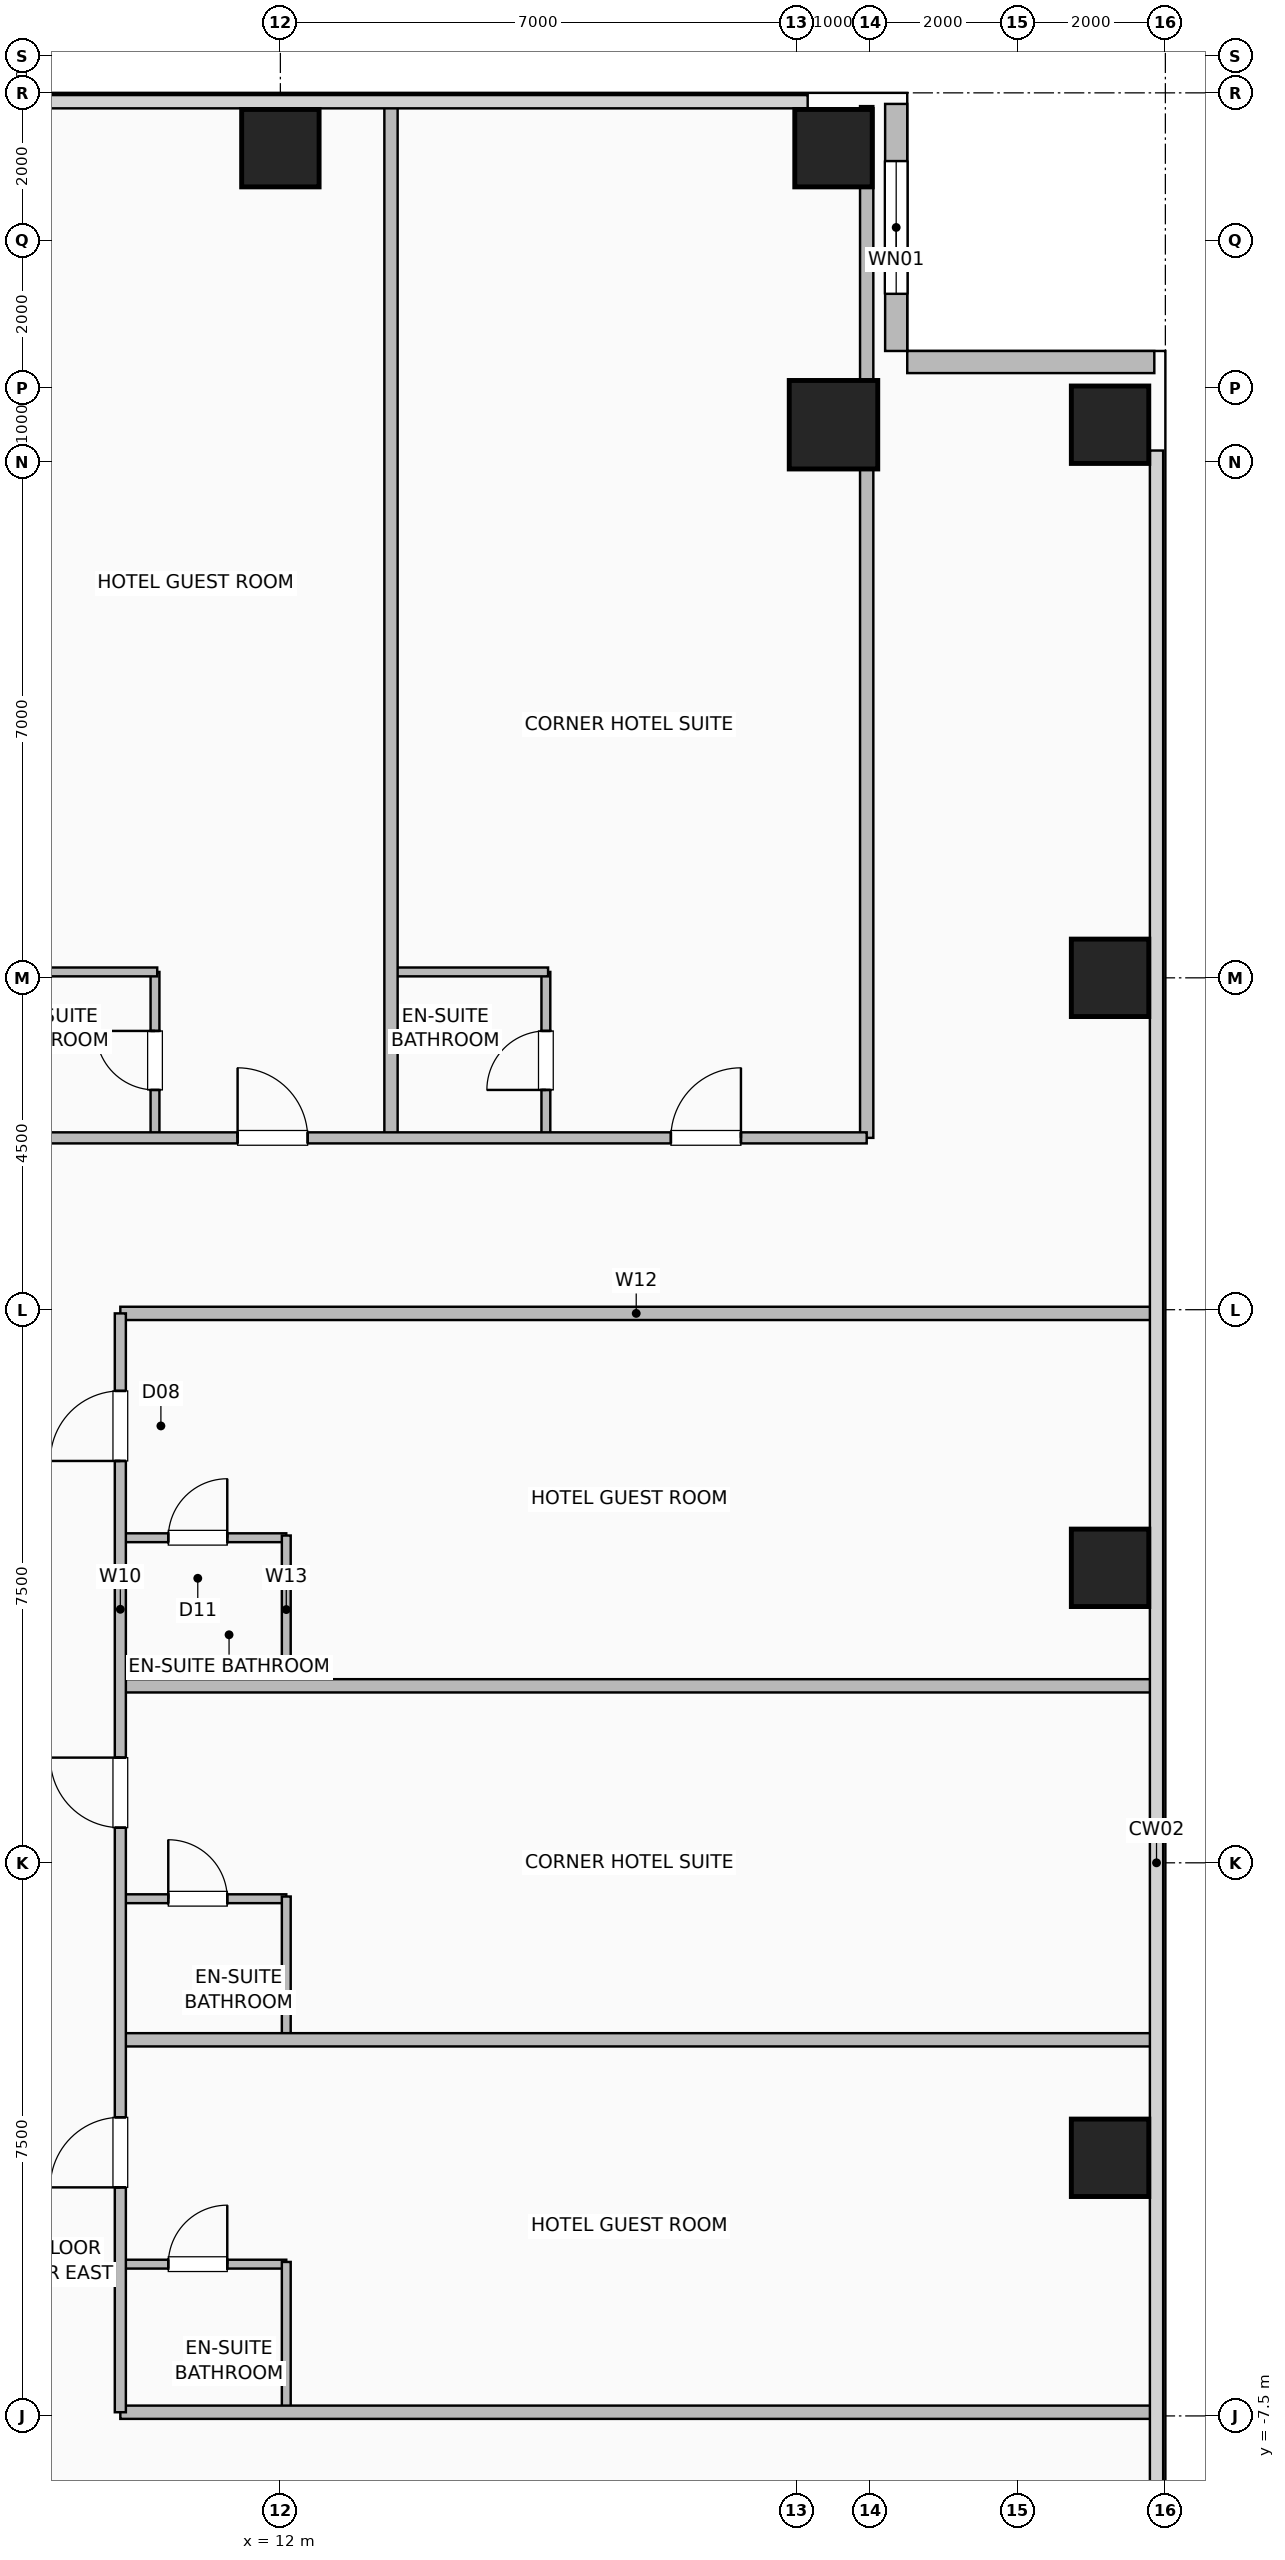
"""IFC4 building model, lengths in metres.
Left out: names, types, materials, properties, quantities, classifications, styles, units other than length and angle.
Written with IfcOpenShell. Run it as: python <this file> out.ifc"""

import sys

from ifc_helpers import new_model, si_unit, direction, frame, frame_2d, origin, origin_2d, place, context, subcontext, project, spatial, rectangle, hollow_rectangle, extrude, element, fill, save


model = new_model("IFC4")
c1 = context("Model", 3, precision=1e-05, world=origin(), true_north=direction((0.0, 1.0)))
c2 = subcontext(c1, "Body", "Model", "MODEL_VIEW")
j1 = project(units=[si_unit("LENGTHUNIT", "METRE"), si_unit("PLANEANGLEUNIT", "RADIAN")], contexts=[c1])
p1 = place(None, origin())
s1 = spatial("IfcSite", under=j1, at=p1, CompositionType="ELEMENT")
p2 = place(p1, origin())
s2 = spatial("IfcBuilding", under=s1, at=p2, CompositionType="ELEMENT")
p3 = place(p2, frame((0.0, 0.0, 72.5)))
s3 = spatial("IfcBuildingStorey", under=s2, at=p3, CompositionType="ELEMENT", Elevation=72.5)
for number, where, z_axis, x_axis in (
    (1, (23.25, -4.0, 0.0), (0.0, 0.0, 1.0), (1.0, 0.0, 0.0)),
    (2, (23.25, 4.0, 0.0), (0.0, 0.0, 1.0), (1.0, 0.0, 0.0)),
    (3, (12.0, 23.25, 0.0), (0.0, 0.0, 1.0), (1.0, 0.0, 0.0)),
    (4, (23.25, 12.0, 0.0), (0.0, 0.0, 1.0), (1.0, 0.0, 0.0)),
    (5, (19.5, 23.25, 0.0), (0.0, 0.0, 1.0), (1.0, 0.0, 0.0)),
    (6, (23.25, 19.5, 0.0), (0.0, 0.0, 1.0), (1.0, 0.0, 0.0)),
):
    element("IfcColumn", number, at=place(p3, frame(where, z_axis=z_axis, x_axis=x_axis)), inside=s3, PredefinedType="COLUMN", context=c2, shape_type="SweptSolid", body=[
        extrude(hollow_rectangle(XDim=1.05, YDim=1.05, WallThickness=0.05, at=origin_2d()), origin(), (0.0, 0.0, 1.0), 3.5),
    ])
p4 = place(p3, frame((19.5, 19.5, 0.0), z_axis=(0.0, 0.0, 1.0), x_axis=(1.0, 0.0, 0.0)))
e7 = element("IfcColumn", 7, at=p4, inside=s3, PredefinedType="COLUMN", context=c2, shape_type="SweptSolid", body=[
    extrude(hollow_rectangle(XDim=1.2, YDim=1.2, WallThickness=0.055, at=origin_2d()), origin(), (0.0, 0.0, 1.0), 3.5),
])
p5 = place(p3, frame((20.35, 23.85, 0.0), z_axis=(0.0, 0.0, 1.0), x_axis=(0.0, -1.0, 0.0)))
e8 = element("IfcWall", 8, at=p5, inside=s3, PredefinedType="SOLIDWALL", context=c2, shape_type="SweptSolid", body=[
    extrude(rectangle(XDim=3.35, YDim=0.3, at=frame_2d((1.675, 0.0))), origin(), (0.0, 0.0, 1.0), 3.25),
])
p6 = place(p5, frame((0.775, 0.0, 0.9)))
e9 = element("IfcOpeningElement", 9, at=p6, cuts=e8, PredefinedType="OPENING", context=c2, shape_type="SweptSolid", body=[
    extrude(rectangle(XDim=1.8, YDim=1.8, at=frame_2d((0.9, 0.9))), frame((0.0, 0.16, 0.0), z_axis=(0.0, -1.0, 0.0), x_axis=(1.0, 0.0, 0.0)), (0.0, 0.0, 1.0), 0.32),
])
p7 = place(p3, frame((23.85, 20.35, 0.0), z_axis=(0.0, 0.0, 1.0), x_axis=(-1.0, 0.0, 0.0)))
e10 = element("IfcWall", 10, at=p7, inside=s3, PredefinedType="SOLIDWALL", context=c2, shape_type="SweptSolid", body=[
    extrude(rectangle(XDim=3.35, YDim=0.3, at=frame_2d((1.675, 0.0))), origin(), (0.0, 0.0, 1.0), 3.25),
])
p8 = place(p3, frame((10.3, 9.83, 0.0), z_axis=(0.0, 0.0, 1.0), x_axis=(0.0, 1.0, 0.0)))
e11 = element("IfcWall", 11, at=p8, inside=s3, PredefinedType="PLUMBINGWALL", context=c2, shape_type="SweptSolid", body=[
    extrude(rectangle(XDim=2.25, YDim=0.12, at=frame_2d((1.125, 0.0))), origin(), (0.0, 0.0, 1.0), 3.25),
])
p9 = place(p8, frame((0.65, 0.0, 0.0)))
e12 = element("IfcOpeningElement", 12, at=p9, cuts=e11, PredefinedType="OPENING", context=c2, shape_type="SweptSolid", body=[
    extrude(rectangle(XDim=0.8, YDim=2.05, at=frame_2d((0.4, 1.025))), frame((0.0, 0.07, 0.0), z_axis=(0.0, -1.0, 0.0), x_axis=(1.0, 0.0, 0.0)), (0.0, 0.0, 1.0), 0.14),
])
p10 = place(p3, frame((8.23, 12.08, 0.0), z_axis=(0.0, 0.0, 1.0), x_axis=(1.0, 0.0, 0.0)))
e13 = element("IfcWall", 13, at=p10, inside=s3, PredefinedType="PLUMBINGWALL", context=c2, shape_type="SweptSolid", body=[
    extrude(rectangle(XDim=2.1, YDim=0.12, at=frame_2d((1.05, 0.0))), origin(), (0.0, 0.0, 1.0), 3.25),
])
p11 = place(p3, frame((15.6, 9.83, 0.0), z_axis=(0.0, 0.0, 1.0), x_axis=(0.0, 1.0, 0.0)))
e14 = element("IfcWall", 14, at=p11, inside=s3, PredefinedType="PLUMBINGWALL", context=c2, shape_type="SweptSolid", body=[
    extrude(rectangle(XDim=2.25, YDim=0.12, at=frame_2d((1.125, 0.0))), origin(), (0.0, 0.0, 1.0), 3.25),
])
p12 = place(p11, frame((0.65, 0.0, 0.0)))
e15 = element("IfcOpeningElement", 15, at=p12, cuts=e14, PredefinedType="OPENING", context=c2, shape_type="SweptSolid", body=[
    extrude(rectangle(XDim=0.8, YDim=2.05, at=frame_2d((0.4, 1.025))), frame((0.0, 0.07, 0.0), z_axis=(0.0, -1.0, 0.0), x_axis=(1.0, 0.0, 0.0)), (0.0, 0.0, 1.0), 0.14),
])
p13 = place(p3, frame((13.53, 12.08, 0.0), z_axis=(0.0, 0.0, 1.0), x_axis=(1.0, 0.0, 0.0)))
e16 = element("IfcWall", 16, at=p13, inside=s3, PredefinedType="PLUMBINGWALL", context=c2, shape_type="SweptSolid", body=[
    extrude(rectangle(XDim=2.1, YDim=0.12, at=frame_2d((1.05, 0.0))), origin(), (0.0, 0.0, 1.0), 3.25),
])
for number, where, z_axis, x_axis in (
    (17, (13.5, 9.83, 0.0), (0.0, 0.0, 1.0), (0.0, 1.0, 0.0)),
    (18, (19.95, 9.83, 0.0), (0.0, 0.0, 1.0), (0.0, 1.0, 0.0)),
):
    element("IfcWall", number, at=place(p3, frame(where, z_axis=z_axis, x_axis=x_axis)), inside=s3, PredefinedType="PARTITIONING", context=c2, shape_type="SweptSolid", body=[
        extrude(rectangle(XDim=13.99, YDim=0.18, at=frame_2d((6.995, 0.0))), origin(), (0.0, 0.0, 1.0), 3.25),
    ])
p14 = place(p3, frame((-19.95, 9.83, 0.0), z_axis=(0.0, 0.0, 1.0), x_axis=(1.0, 0.0, 0.0)))
e19 = element("IfcWall", 19, at=p14, inside=s3, PredefinedType="PARTITIONING", context=c2, shape_type="SweptSolid", body=[
    extrude(rectangle(XDim=39.9, YDim=0.15, at=frame_2d((19.95, 0.0))), origin(), (0.0, 0.0, 1.0), 3.25),
])
p15 = place(p14, frame((3.945, 0.0, 0.0)))
e20 = element("IfcOpeningElement", 20, at=p15, cuts=e19, PredefinedType="OPENING", context=c2, shape_type="SweptSolid", body=[
    extrude(rectangle(XDim=0.95, YDim=2.08, at=frame_2d((0.475, 1.04))), frame((0.0, 0.085, 0.0), z_axis=(0.0, -1.0, 0.0), x_axis=(1.0, 0.0, 0.0)), (0.0, 0.0, 1.0), 0.17),
])
p16 = place(p14, frame((10.02, 0.0, 0.0)))
e21 = element("IfcOpeningElement", 21, at=p16, cuts=e19, PredefinedType="OPENING", context=c2, shape_type="SweptSolid", body=[
    extrude(rectangle(XDim=0.95, YDim=2.08, at=frame_2d((0.475, 1.04))), frame((0.0, 0.085, 0.0), z_axis=(0.0, -1.0, 0.0), x_axis=(1.0, 0.0, 0.0)), (0.0, 0.0, 1.0), 0.17),
])
p17 = place(p14, frame((15.42, 0.0, 0.0)))
e22 = element("IfcOpeningElement", 22, at=p17, cuts=e19, PredefinedType="OPENING", context=c2, shape_type="SweptSolid", body=[
    extrude(rectangle(XDim=0.95, YDim=2.08, at=frame_2d((0.475, 1.04))), frame((0.0, 0.085, 0.0), z_axis=(0.0, -1.0, 0.0), x_axis=(1.0, 0.0, 0.0)), (0.0, 0.0, 1.0), 0.17),
])
p18 = place(p14, frame((20.702, 0.0, 0.0)))
e23 = element("IfcOpeningElement", 23, at=p18, cuts=e19, PredefinedType="OPENING", context=c2, shape_type="SweptSolid", body=[
    extrude(rectangle(XDim=0.95, YDim=2.08, at=frame_2d((0.475, 1.04))), frame((0.0, 0.085, 0.0), z_axis=(0.0, -1.0, 0.0), x_axis=(1.0, 0.0, 0.0)), (0.0, 0.0, 1.0), 0.17),
])
p19 = place(p14, frame((26.02, 0.0, 0.0)))
e24 = element("IfcOpeningElement", 24, at=p19, cuts=e19, PredefinedType="OPENING", context=c2, shape_type="SweptSolid", body=[
    extrude(rectangle(XDim=0.95, YDim=2.08, at=frame_2d((0.475, 1.04))), frame((0.0, 0.085, 0.0), z_axis=(0.0, -1.0, 0.0), x_axis=(1.0, 0.0, 0.0)), (0.0, 0.0, 1.0), 0.17),
])
p20 = place(p14, frame((31.37, 0.0, 0.0)))
e25 = element("IfcOpeningElement", 25, at=p20, cuts=e19, PredefinedType="OPENING", context=c2, shape_type="SweptSolid", body=[
    extrude(rectangle(XDim=0.95, YDim=2.08, at=frame_2d((0.475, 1.04))), frame((0.0, 0.085, 0.0), z_axis=(0.0, -1.0, 0.0), x_axis=(1.0, 0.0, 0.0)), (0.0, 0.0, 1.0), 0.17),
])
p21 = place(p14, frame((37.245, 0.0, 0.0)))
e26 = element("IfcOpeningElement", 26, at=p21, cuts=e19, PredefinedType="OPENING", context=c2, shape_type="SweptSolid", body=[
    extrude(rectangle(XDim=0.95, YDim=2.08, at=frame_2d((0.475, 1.04))), frame((0.0, 0.085, 0.0), z_axis=(0.0, -1.0, 0.0), x_axis=(1.0, 0.0, 0.0)), (0.0, 0.0, 1.0), 0.17),
])
p22 = place(p3, frame((9.83, -5.442, 0.0), z_axis=(0.0, 0.0, 1.0), x_axis=(1.0, 0.0, 0.0)))
e27 = element("IfcWall", 27, at=p22, inside=s3, PredefinedType="PLUMBINGWALL", context=c2, shape_type="SweptSolid", body=[
    extrude(rectangle(XDim=2.25, YDim=0.12, at=frame_2d((1.125, 0.0))), origin(), (0.0, 0.0, 1.0), 3.25),
])
p23 = place(p22, frame((0.65, 0.0, 0.0)))
e28 = element("IfcOpeningElement", 28, at=p23, cuts=e27, PredefinedType="OPENING", context=c2, shape_type="SweptSolid", body=[
    extrude(rectangle(XDim=0.8, YDim=2.05, at=frame_2d((0.4, 1.025))), frame((0.0, 0.07, 0.0), z_axis=(0.0, -1.0, 0.0), x_axis=(1.0, 0.0, 0.0)), (0.0, 0.0, 1.0), 0.14),
])
p24 = place(p3, frame((12.08, -7.42, 0.0), z_axis=(0.0, 0.0, 1.0), x_axis=(0.0, 1.0, 0.0)))
e29 = element("IfcWall", 29, at=p24, inside=s3, PredefinedType="PLUMBINGWALL", context=c2, shape_type="SweptSolid", body=[
    extrude(rectangle(XDim=2.008, YDim=0.12, at=frame_2d((1.004, 0.0))), origin(), (0.0, 0.0, 1.0), 3.25),
])
p25 = place(p3, frame((9.83, -0.487, 0.0), z_axis=(0.0, 0.0, 1.0), x_axis=(1.0, 0.0, 0.0)))
e30 = element("IfcWall", 30, at=p25, inside=s3, PredefinedType="PLUMBINGWALL", context=c2, shape_type="SweptSolid", body=[
    extrude(rectangle(XDim=2.25, YDim=0.12, at=frame_2d((1.125, 0.0))), origin(), (0.0, 0.0, 1.0), 3.25),
])
p26 = place(p25, frame((0.65, 0.0, 0.0)))
e31 = element("IfcOpeningElement", 31, at=p26, cuts=e30, PredefinedType="OPENING", context=c2, shape_type="SweptSolid", body=[
    extrude(rectangle(XDim=0.8, YDim=2.05, at=frame_2d((0.4, 1.025))), frame((0.0, 0.07, 0.0), z_axis=(0.0, -1.0, 0.0), x_axis=(1.0, 0.0, 0.0)), (0.0, 0.0, 1.0), 0.14),
])
p27 = place(p3, frame((12.08, -2.37, 0.0), z_axis=(0.0, 0.0, 1.0), x_axis=(0.0, 1.0, 0.0)))
e32 = element("IfcWall", 32, at=p27, inside=s3, PredefinedType="PLUMBINGWALL", context=c2, shape_type="SweptSolid", body=[
    extrude(rectangle(XDim=1.913, YDim=0.12, at=frame_2d((0.957, 0.0))), origin(), (0.0, 0.0, 1.0), 3.25),
])
p28 = place(p3, frame((9.83, 4.408, 0.0), z_axis=(0.0, 0.0, 1.0), x_axis=(1.0, 0.0, 0.0)))
e33 = element("IfcWall", 33, at=p28, inside=s3, PredefinedType="PLUMBINGWALL", context=c2, shape_type="SweptSolid", body=[
    extrude(rectangle(XDim=2.25, YDim=0.12, at=frame_2d((1.125, 0.0))), origin(), (0.0, 0.0, 1.0), 3.25),
])
p29 = place(p28, frame((0.65, 0.0, 0.0)))
e34 = element("IfcOpeningElement", 34, at=p29, cuts=e33, PredefinedType="OPENING", context=c2, shape_type="SweptSolid", body=[
    extrude(rectangle(XDim=0.8, YDim=2.05, at=frame_2d((0.4, 1.025))), frame((0.0, 0.07, 0.0), z_axis=(0.0, -1.0, 0.0), x_axis=(1.0, 0.0, 0.0)), (0.0, 0.0, 1.0), 0.14),
])
p30 = place(p3, frame((12.08, 2.43, 0.0), z_axis=(0.0, 0.0, 1.0), x_axis=(0.0, 1.0, 0.0)))
e35 = element("IfcWall", 35, at=p30, inside=s3, PredefinedType="PLUMBINGWALL", context=c2, shape_type="SweptSolid", body=[
    extrude(rectangle(XDim=2.008, YDim=0.12, at=frame_2d((1.004, 0.0))), origin(), (0.0, 0.0, 1.0), 3.25),
])
for number, where, z_axis, x_axis in (
    (36, (9.83, -7.45, 0.0), (0.0, 0.0, 1.0), (1.0, 0.0, 0.0)),
    (37, (9.83, -2.4, 0.0), (0.0, 0.0, 1.0), (1.0, 0.0, 0.0)),
    (38, (9.83, 2.4, 0.0), (0.0, 0.0, 1.0), (1.0, 0.0, 0.0)),
    (39, (9.83, 7.45, 0.0), (0.0, 0.0, 1.0), (1.0, 0.0, 0.0)),
):
    element("IfcWall", number, at=place(p3, frame(where, z_axis=z_axis, x_axis=x_axis)), inside=s3, PredefinedType="PARTITIONING", context=c2, shape_type="SweptSolid", body=[
        extrude(rectangle(XDim=13.99, YDim=0.18, at=frame_2d((6.995, 0.0))), origin(), (0.0, 0.0, 1.0), 3.25),
    ])
p31 = place(p3, frame((9.83, -7.45, 0.0), z_axis=(0.0, 0.0, 1.0), x_axis=(0.0, 1.0, 0.0)))
e40 = element("IfcWall", 40, at=p31, inside=s3, PredefinedType="PARTITIONING", context=c2, shape_type="SweptSolid", body=[
    extrude(rectangle(XDim=14.9, YDim=0.15, at=frame_2d((7.45, 0.0))), origin(), (0.0, 0.0, 1.0), 3.25),
])
p32 = place(p31, frame((3.049, 0.0, 0.0)))
e41 = element("IfcOpeningElement", 41, at=p32, cuts=e40, PredefinedType="OPENING", context=c2, shape_type="SweptSolid", body=[
    extrude(rectangle(XDim=0.95, YDim=2.08, at=frame_2d((0.475, 1.04))), frame((0.0, 0.085, 0.0), z_axis=(0.0, -1.0, 0.0), x_axis=(1.0, 0.0, 0.0)), (0.0, 0.0, 1.0), 0.17),
])
p33 = place(p31, frame((7.927, 0.0, 0.0)))
e42 = element("IfcOpeningElement", 42, at=p33, cuts=e40, PredefinedType="OPENING", context=c2, shape_type="SweptSolid", body=[
    extrude(rectangle(XDim=0.95, YDim=2.08, at=frame_2d((0.475, 1.04))), frame((0.0, 0.085, 0.0), z_axis=(0.0, -1.0, 0.0), x_axis=(1.0, 0.0, 0.0)), (0.0, 0.0, 1.0), 0.17),
])
p34 = place(p31, frame((12.899, 0.0, 0.0)))
e43 = element("IfcOpeningElement", 43, at=p34, cuts=e40, PredefinedType="OPENING", context=c2, shape_type="SweptSolid", body=[
    extrude(rectangle(XDim=0.95, YDim=2.08, at=frame_2d((0.475, 1.04))), frame((0.0, 0.085, 0.0), z_axis=(0.0, -1.0, 0.0), x_axis=(1.0, 0.0, 0.0)), (0.0, 0.0, 1.0), 0.17),
])
p35 = place(p6, origin())
e44 = element("IfcWindow", 44, at=p35, inside=s3, PartitioningType="SINGLE_PANEL", PredefinedType="WINDOW", context=c2, shape_type="SweptSolid", body=[
    extrude(rectangle(XDim=1.8, YDim=1.8, at=frame_2d((0.9, 0.9))), frame((0.0, 0.03, 0.0), z_axis=(0.0, -1.0, 0.0), x_axis=(1.0, 0.0, 0.0)), (0.0, 0.0, 1.0), 0.06),
])
fill(e9, e44)
p36 = place(p9, origin())
e45 = element("IfcDoor", 45, at=p36, inside=s3, OperationType="SINGLE_SWING_RIGHT", PredefinedType="DOOR", context=c2, shape_type="SweptSolid", body=[
    extrude(rectangle(XDim=0.8, YDim=2.05, at=frame_2d((0.4, 1.025))), frame((0.0, 0.025, 0.0), z_axis=(0.0, -1.0, 0.0), x_axis=(1.0, 0.0, 0.0)), (0.0, 0.0, 1.0), 0.05),
])
fill(e12, e45)
p37 = place(p12, origin())
e46 = element("IfcDoor", 46, at=p37, inside=s3, OperationType="SINGLE_SWING_LEFT", PredefinedType="DOOR", context=c2, shape_type="SweptSolid", body=[
    extrude(rectangle(XDim=0.8, YDim=2.05, at=frame_2d((0.4, 1.025))), frame((0.0, 0.025, 0.0), z_axis=(0.0, -1.0, 0.0), x_axis=(1.0, 0.0, 0.0)), (0.0, 0.0, 1.0), 0.05),
])
fill(e15, e46)
p38 = place(p20, origin())
e47 = element("IfcDoor", 47, at=p38, inside=s3, OperationType="SINGLE_SWING_LEFT", PredefinedType="DOOR", context=c2, shape_type="SweptSolid", body=[
    extrude(rectangle(XDim=0.95, YDim=2.08, at=frame_2d((0.475, 1.04))), frame((0.0, 0.025, 0.0), z_axis=(0.0, -1.0, 0.0), x_axis=(1.0, 0.0, 0.0)), (0.0, 0.0, 1.0), 0.05),
])
fill(e25, e47)
p39 = place(p21, origin())
e48 = element("IfcDoor", 48, at=p39, inside=s3, OperationType="SINGLE_SWING_RIGHT", PredefinedType="DOOR", context=c2, shape_type="SweptSolid", body=[
    extrude(rectangle(XDim=0.95, YDim=2.08, at=frame_2d((0.475, 1.04))), frame((0.0, 0.025, 0.0), z_axis=(0.0, -1.0, 0.0), x_axis=(1.0, 0.0, 0.0)), (0.0, 0.0, 1.0), 0.05),
])
fill(e26, e48)
p40 = place(p23, origin())
e49 = element("IfcDoor", 49, at=p40, inside=s3, OperationType="SINGLE_SWING_RIGHT", PredefinedType="DOOR", context=c2, shape_type="SweptSolid", body=[
    extrude(rectangle(XDim=0.8, YDim=2.05, at=frame_2d((0.4, 1.025))), frame((0.0, 0.025, 0.0), z_axis=(0.0, -1.0, 0.0), x_axis=(1.0, 0.0, 0.0)), (0.0, 0.0, 1.0), 0.05),
])
fill(e28, e49)
p41 = place(p26, origin())
e50 = element("IfcDoor", 50, at=p41, inside=s3, OperationType="SINGLE_SWING_LEFT", PredefinedType="DOOR", context=c2, shape_type="SweptSolid", body=[
    extrude(rectangle(XDim=0.8, YDim=2.05, at=frame_2d((0.4, 1.025))), frame((0.0, 0.025, 0.0), z_axis=(0.0, -1.0, 0.0), x_axis=(1.0, 0.0, 0.0)), (0.0, 0.0, 1.0), 0.05),
])
fill(e31, e50)
p42 = place(p29, origin())
e51 = element("IfcDoor", 51, at=p42, inside=s3, OperationType="SINGLE_SWING_RIGHT", PredefinedType="DOOR", context=c2, shape_type="SweptSolid", body=[
    extrude(rectangle(XDim=0.8, YDim=2.05, at=frame_2d((0.4, 1.025))), frame((0.0, 0.025, 0.0), z_axis=(0.0, -1.0, 0.0), x_axis=(1.0, 0.0, 0.0)), (0.0, 0.0, 1.0), 0.05),
])
fill(e34, e51)
p43 = place(p32, origin())
e52 = element("IfcDoor", 52, at=p43, inside=s3, OperationType="SINGLE_SWING_LEFT", PredefinedType="DOOR", context=c2, shape_type="SweptSolid", body=[
    extrude(rectangle(XDim=0.95, YDim=2.08, at=frame_2d((0.475, 1.04))), frame((0.0, 0.025, 0.0), z_axis=(0.0, -1.0, 0.0), x_axis=(1.0, 0.0, 0.0)), (0.0, 0.0, 1.0), 0.05),
])
fill(e41, e52)
p44 = place(p33, origin())
e53 = element("IfcDoor", 53, at=p44, inside=s3, OperationType="SINGLE_SWING_RIGHT", PredefinedType="DOOR", context=c2, shape_type="SweptSolid", body=[
    extrude(rectangle(XDim=0.95, YDim=2.08, at=frame_2d((0.475, 1.04))), frame((0.0, 0.025, 0.0), z_axis=(0.0, -1.0, 0.0), x_axis=(1.0, 0.0, 0.0)), (0.0, 0.0, 1.0), 0.05),
])
fill(e42, e53)
p45 = place(p34, origin())
e54 = element("IfcDoor", 54, at=p45, inside=s3, OperationType="SINGLE_SWING_LEFT", PredefinedType="DOOR", context=c2, shape_type="SweptSolid", body=[
    extrude(rectangle(XDim=0.95, YDim=2.08, at=frame_2d((0.475, 1.04))), frame((0.0, 0.025, 0.0), z_axis=(0.0, -1.0, 0.0), x_axis=(1.0, 0.0, 0.0)), (0.0, 0.0, 1.0), 0.05),
])
fill(e43, e54)
save(model, sys.argv[1])
